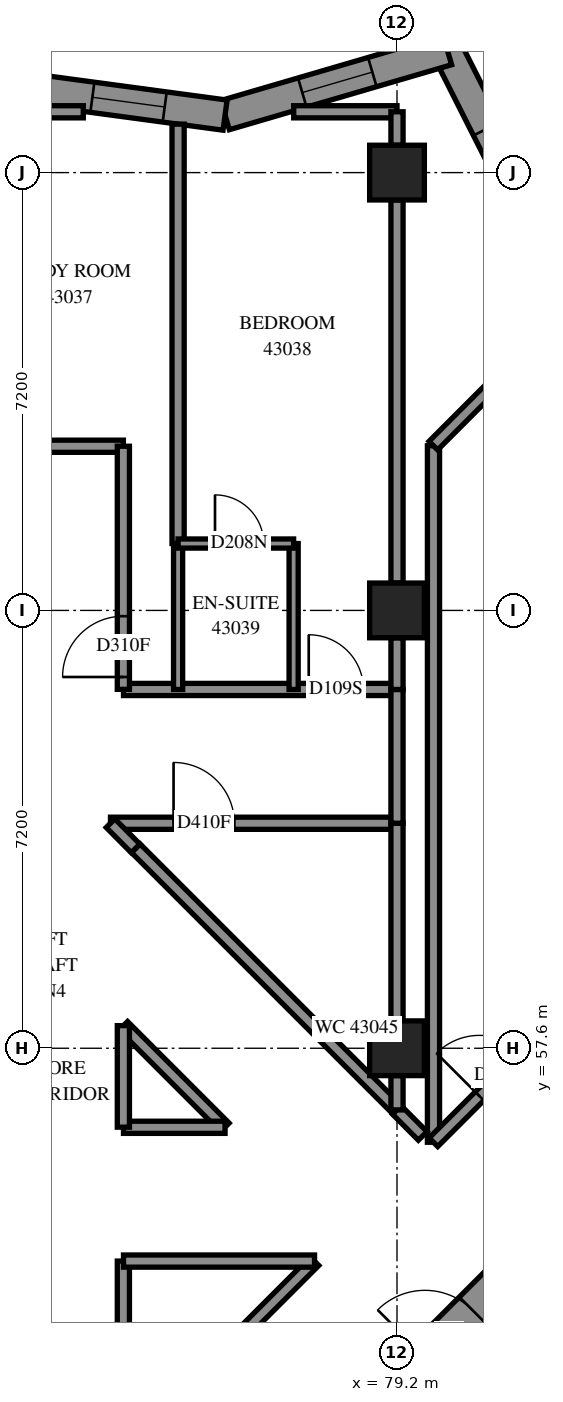
"""IFC4 building model, lengths in metres.
Left out: names, types, materials, properties, quantities, classifications, styles, units other than length and angle.
Written with IfcOpenShell. Run it as: python <this file> out.ifc"""

import sys

from ifc_helpers import new_model, si_unit, direction, frame, frame_2d, origin, origin_2d, place, context, subcontext, project, spatial, polyline, rectangle, outline, extrude, element, fill, save


model = new_model("IFC4")
c1 = context("Model", 3, precision=1e-05, world=origin(), true_north=direction((0.0, 1.0)))
c2 = subcontext(c1, "Body", "Model", "MODEL_VIEW")
j1 = project(units=[si_unit("LENGTHUNIT", "METRE"), si_unit("PLANEANGLEUNIT", "RADIAN")], contexts=[c1])
p1 = place(None, origin())
s1 = spatial("IfcSite", under=j1, at=p1, CompositionType="ELEMENT")
p2 = place(p1, origin())
s2 = spatial("IfcBuilding", under=s1, at=p2, CompositionType="ELEMENT")
p3 = place(p2, frame((0.0, 0.0, 159.2)))
s3 = spatial("IfcBuildingStorey", under=s2, at=p3, CompositionType="ELEMENT", Elevation=159.2)
for number, where, z_axis, x_axis in (
    (1, (79.2, 57.6, 0.0), (0.0, 0.0, 1.0), (1.0, 0.0, 0.0)),
    (2, (79.2, 64.8, 0.0), (0.0, 0.0, 1.0), (1.0, 0.0, 0.0)),
    (3, (79.2, 72.0, 0.0), (0.0, 0.0, 1.0), (1.0, 0.0, 0.0)),
):
    element("IfcColumn", number, at=place(p3, frame(where, z_axis=z_axis, x_axis=x_axis)), inside=s3, PredefinedType="COLUMN", context=c2, shape_type="SweptSolid", body=[
        extrude(rectangle(XDim=0.9, YDim=0.9, at=origin_2d()), origin(), (0.0, 0.0, 1.0), 3.1),
    ])
p4 = place(p3, frame((76.442, 49.302, -0.3), z_axis=(0.0, 0.0, 1.0), x_axis=(0.7071067812, 0.7071067812, 0.0)))
e4 = element("IfcWall", 4, at=p4, inside=s3, PredefinedType="SHEAR", context=c2, shape_type="SweptSolid", body=[
    extrude(rectangle(XDim=14.4, YDim=0.6, at=frame_2d((7.2, 0.0))), origin(), (0.0, 0.0, 1.0), 2.7),
])
p5 = place(p4, frame((4.55, 0.0, 0.3)))
e5 = element("IfcOpeningElement", 5, at=p5, cuts=e4, PredefinedType="OPENING", context=c2, shape_type="SweptSolid", body=[
    extrude(rectangle(XDim=1.1, YDim=2.1, at=frame_2d((0.55, 1.05))), frame((0.0, 0.31, 0.0), z_axis=(0.0, -1.0, 0.0), x_axis=(1.0, 0.0, 0.0)), (0.0, 0.0, 1.0), 0.62),
])
p6 = place(p4, frame((11.35, 0.0, 0.3)))
e6 = element("IfcOpeningElement", 6, at=p6, cuts=e4, PredefinedType="OPENING", context=c2, shape_type="SweptSolid", body=[
    extrude(rectangle(XDim=1.1, YDim=2.1, at=frame_2d((0.55, 1.05))), frame((0.0, 0.31, 0.0), z_axis=(0.0, -1.0, 0.0), x_axis=(1.0, 0.0, 0.0)), (0.0, 0.0, 1.0), 0.62),
])
p7 = place(p3, frame((81.565, 70.97, 0.0), z_axis=(0.0, 0.0, 1.0), x_axis=(-0.4506826549, 0.8926842357, 0.0)))
e7 = element("IfcWall", 7, at=p7, inside=s3, PredefinedType="SOLIDWALL", context=c2, shape_type="SweptSolid", body=[
    extrude(outline(polyline([(0.06, -0.25), (3.618, -0.25), (3.202, 0.25), (-0.06, 0.25), (0.06, -0.25)])), origin(), (0.0, 0.0, 1.0), 3.1),
])
p8 = place(p7, frame((0.764, 0.0, 0.45)))
e8 = element("IfcOpeningElement", 8, at=p8, cuts=e7, PredefinedType="OPENING", context=c2, shape_type="SweptSolid", body=[
    extrude(rectangle(XDim=1.2, YDim=2.5, at=frame_2d((0.6, 1.25))), frame((0.0, 0.26, 0.0), z_axis=(0.0, -1.0, 0.0), x_axis=(1.0, 0.0, 0.0)), (0.0, 0.0, 1.0), 0.52),
])
p9 = place(p3, frame((80.028, 74.014, 0.0), z_axis=(0.0, 0.0, 1.0), x_axis=(-0.9598407547, -0.2805454075, 0.0)))
e9 = element("IfcWall", 9, at=p9, inside=s3, PredefinedType="SOLIDWALL", context=c2, shape_type="SweptSolid", body=[
    extrude(outline(polyline([(-0.208, -0.25), (3.756, -0.25), (3.862, 0.25), (0.208, 0.25), (-0.208, -0.25)])), origin(), (0.0, 0.0, 1.0), 3.1),
])
p10 = place(p9, frame((1.286, 0.0, 0.45)))
e10 = element("IfcOpeningElement", 10, at=p10, cuts=e9, PredefinedType="OPENING", context=c2, shape_type="SweptSolid", body=[
    extrude(rectangle(XDim=1.2, YDim=2.5, at=frame_2d((0.6, 1.25))), frame((0.0, 0.26, 0.0), z_axis=(0.0, -1.0, 0.0), x_axis=(1.0, 0.0, 0.0)), (0.0, 0.0, 1.0), 0.52),
])
p11 = place(p3, frame((76.373, 72.945, 0.0), z_axis=(0.0, 0.0, 1.0), x_axis=(-0.9910680415, 0.1333571784, 0.0)))
e11 = element("IfcWall", 11, at=p11, inside=s3, PredefinedType="SOLIDWALL", context=c2, shape_type="SweptSolid", body=[
    extrude(outline(polyline([(0.053, -0.25), (3.892, -0.25), (3.824, 0.25), (-0.053, 0.25), (0.053, -0.25)])), origin(), (0.0, 0.0, 1.0), 3.1),
])
p12 = place(p11, frame((1.002, 0.0, 0.45)))
e12 = element("IfcOpeningElement", 12, at=p12, cuts=e11, PredefinedType="OPENING", context=c2, shape_type="SweptSolid", body=[
    extrude(rectangle(XDim=1.2, YDim=2.5, at=frame_2d((0.6, 1.25))), frame((0.0, 0.26, 0.0), z_axis=(0.0, -1.0, 0.0), x_axis=(1.0, 0.0, 0.0)), (0.0, 0.0, 1.0), 0.52),
])
p13 = place(p3, frame((54.9, 67.5, 0.0), z_axis=(0.0, 0.0, 1.0), x_axis=(1.0, 0.0, 0.0)))
e13 = element("IfcWall", 13, at=p13, inside=s3, PredefinedType="PARTITIONING", context=c2, shape_type="SweptSolid", body=[
    extrude(rectangle(XDim=19.8, YDim=0.2, at=frame_2d((9.9, 0.0))), origin(), (0.0, 0.0, 1.0), 3.1),
])
p14 = place(p13, frame((6.599, 0.0, 0.0)))
e14 = element("IfcOpeningElement", 14, at=p14, cuts=e13, PredefinedType="OPENING", context=c2, shape_type="SweptSolid", body=[
    extrude(rectangle(XDim=0.9, YDim=2.1, at=frame_2d((0.45, 1.05))), frame((0.0, 0.11, 0.0), z_axis=(0.0, -1.0, 0.0), x_axis=(1.0, 0.0, 0.0)), (0.0, 0.0, 1.0), 0.22),
])
p15 = place(p13, frame((13.799, 0.0, 0.0)))
e15 = element("IfcOpeningElement", 15, at=p15, cuts=e13, PredefinedType="OPENING", context=c2, shape_type="SweptSolid", body=[
    extrude(rectangle(XDim=0.9, YDim=2.1, at=frame_2d((0.45, 1.05))), frame((0.0, 0.11, 0.0), z_axis=(0.0, -1.0, 0.0), x_axis=(1.0, 0.0, 0.0)), (0.0, 0.0, 1.0), 0.22),
])
p16 = place(p3, frame((79.8, 56.054, 0.0), z_axis=(0.0, 0.0, 1.0), x_axis=(0.0, 1.0, 0.0)))
e16 = element("IfcWall", 16, at=p16, inside=s3, PredefinedType="PARTITIONING", context=c2, shape_type="SweptSolid", body=[
    extrude(rectangle(XDim=11.454, YDim=0.2, at=frame_2d((5.727, 0.0))), origin(), (0.0, 0.0, 1.0), 3.1),
])
p17 = place(p3, frame((79.799, 56.055, 0.0), z_axis=(0.0, 0.0, 1.0), x_axis=(0.7071067812, 0.7071067812, 0.0)))
e17 = element("IfcWall", 17, at=p17, inside=s3, PredefinedType="PARTITIONING", context=c2, shape_type="SweptSolid", body=[
    extrude(rectangle(XDim=9.95, YDim=0.2, at=frame_2d((4.975, 0.0))), origin(), (0.0, 0.0, 1.0), 3.1),
])
p18 = place(p17, frame((1.071, 0.0, 0.0)))
e18 = element("IfcOpeningElement", 18, at=p18, cuts=e17, PredefinedType="OPENING", context=c2, shape_type="SweptSolid", body=[
    extrude(rectangle(XDim=1.0, YDim=2.1, at=frame_2d((0.5, 1.05))), frame((0.0, 0.11, 0.0), z_axis=(0.0, -1.0, 0.0), x_axis=(1.0, 0.0, 0.0)), (0.0, 0.0, 1.0), 0.22),
])
p19 = place(p3, frame((75.6, 65.9, 0.0), z_axis=(0.0, 0.0, 1.0), x_axis=(0.0, 1.0, 0.0)))
e19 = element("IfcWall", 19, at=p19, inside=s3, PredefinedType="PARTITIONING", context=c2, shape_type="SweptSolid", body=[
    extrude(rectangle(XDim=6.897, YDim=0.2, at=frame_2d((3.448, 0.0))), origin(), (0.0, 0.0, 1.0), 3.1),
])
p20 = place(p3, frame((79.2, 65.25, 0.0), z_axis=(0.0, 0.0, 1.0), x_axis=(0.0, 1.0, 0.0)))
e20 = element("IfcWall", 20, at=p20, inside=s3, PredefinedType="PARTITIONING", context=c2, shape_type="SweptSolid", body=[
    extrude(rectangle(XDim=6.3, YDim=0.2, at=frame_2d((3.15, 0.0))), origin(), (0.0, 0.0, 1.0), 3.1),
])
p21 = place(p3, frame((74.903, 60.889, 0.0), z_axis=(0.0, 0.0, 1.0), x_axis=(0.7071067812, -0.7071067812, 0.0)))
e21 = element("IfcWall", 21, at=p21, inside=s3, PredefinedType="PARTITIONING", context=c2, shape_type="SweptSolid", body=[
    extrude(rectangle(XDim=6.081, YDim=0.2, at=frame_2d((3.041, 0.0))), origin(), (0.0, 0.0, 1.0), 3.1),
])
p22 = place(p3, frame((74.488, 61.3, 0.0), z_axis=(0.0, 0.0, 1.0), x_axis=(1.0, 0.0, 0.0)))
e22 = element("IfcWall", 22, at=p22, inside=s3, PredefinedType="PARTITIONING", context=c2, shape_type="SweptSolid", body=[
    extrude(rectangle(XDim=4.712, YDim=0.2, at=frame_2d((2.356, 0.0))), origin(), (0.0, 0.0, 1.0), 3.1),
])
p23 = place(p22, frame((1.037, 0.0, 0.0)))
e23 = element("IfcOpeningElement", 23, at=p23, cuts=e22, PredefinedType="OPENING", context=c2, shape_type="SweptSolid", body=[
    extrude(rectangle(XDim=1.0, YDim=2.1, at=frame_2d((0.5, 1.05))), frame((0.0, 0.11, 0.0), z_axis=(0.0, -1.0, 0.0), x_axis=(1.0, 0.0, 0.0)), (0.0, 0.0, 1.0), 0.22),
])
p24 = place(p3, frame((74.702, 63.5, 0.0), z_axis=(0.0, 0.0, 1.0), x_axis=(1.0, 0.0, 0.0)))
e24 = element("IfcWall", 24, at=p24, inside=s3, PredefinedType="PARTITIONING", context=c2, shape_type="SweptSolid", body=[
    extrude(rectangle(XDim=4.498, YDim=0.2, at=frame_2d((2.249, 0.0))), origin(), (0.0, 0.0, 1.0), 3.1),
])
p25 = place(p24, frame((3.046, 0.0, 0.0)))
e25 = element("IfcOpeningElement", 25, at=p25, cuts=e24, PredefinedType="OPENING", context=c2, shape_type="SweptSolid", body=[
    extrude(rectangle(XDim=0.9, YDim=2.1, at=frame_2d((0.45, 1.05))), frame((0.0, 0.11, 0.0), z_axis=(0.0, -1.0, 0.0), x_axis=(1.0, 0.0, 0.0)), (0.0, 0.0, 1.0), 0.22),
])
p26 = place(p3, frame((74.701, 50.957, 0.0), z_axis=(0.0, 0.0, 1.0), x_axis=(0.7071067812, 0.7071067812, 0.0)))
e26 = element("IfcWall", 26, at=p26, inside=s3, PredefinedType="PARTITIONING", context=c2, shape_type="SweptSolid", body=[
    extrude(rectangle(XDim=4.444, YDim=0.2, at=frame_2d((2.222, 0.0))), origin(), (0.0, 0.0, 1.0), 3.1),
])
p27 = place(p3, frame((74.7, 63.502, 0.0), z_axis=(0.0, 0.0, 1.0), x_axis=(0.0, 1.0, 0.0)))
e27 = element("IfcWall", 27, at=p27, inside=s3, PredefinedType="PARTITIONING", context=c2, shape_type="SweptSolid", body=[
    extrude(rectangle(XDim=3.998, YDim=0.2, at=frame_2d((1.999, 0.0))), origin(), (0.0, 0.0, 1.0), 3.1),
])
p28 = place(p27, frame((0.203, 0.0, 0.0)))
e28 = element("IfcOpeningElement", 28, at=p28, cuts=e27, PredefinedType="OPENING", context=c2, shape_type="SweptSolid", body=[
    extrude(rectangle(XDim=1.0, YDim=2.1, at=frame_2d((0.5, 1.05))), frame((0.0, 0.11, 0.0), z_axis=(0.0, -1.0, 0.0), x_axis=(1.0, 0.0, 0.0)), (0.0, 0.0, 1.0), 0.22),
])
p29 = place(p3, frame((79.798, 67.51, 0.0), z_axis=(0.0, 0.0, 1.0), x_axis=(0.7068308048, 0.7073826499, 0.0)))
e29 = element("IfcWall", 29, at=p29, inside=s3, PredefinedType="PARTITIONING", context=c2, shape_type="SweptSolid", body=[
    extrude(rectangle(XDim=3.624, YDim=0.2, at=frame_2d((1.812, 0.0))), origin(), (0.0, 0.0, 1.0), 3.1),
])
p30 = place(p3, frame((79.2, 58.05, 0.0), z_axis=(0.0, 0.0, 1.0), x_axis=(0.0, 1.0, 0.0)))
e30 = element("IfcWall", 30, at=p30, inside=s3, PredefinedType="PARTITIONING", context=c2, shape_type="SweptSolid", body=[
    extrude(rectangle(XDim=3.25, YDim=0.2, at=frame_2d((1.625, 0.0))), origin(), (0.0, 0.0, 1.0), 3.1),
])
p31 = place(p3, frame((74.7, 50.956, 0.0), z_axis=(0.0, 0.0, 1.0), x_axis=(0.0, 1.0, 0.0)))
e31 = element("IfcWall", 31, at=p31, inside=s3, PredefinedType="PARTITIONING", context=c2, shape_type="SweptSolid", body=[
    extrude(rectangle(XDim=3.144, YDim=0.2, at=frame_2d((1.572, 0.0))), origin(), (0.0, 0.0, 1.0), 3.1),
])
p32 = place(p3, frame((74.702, 54.1, 0.0), z_axis=(0.0, 0.0, 1.0), x_axis=(1.0, 0.0, 0.0)))
e32 = element("IfcWall", 32, at=p32, inside=s3, PredefinedType="PARTITIONING", context=c2, shape_type="SweptSolid", body=[
    extrude(rectangle(XDim=3.142, YDim=0.2, at=frame_2d((1.571, 0.0))), origin(), (0.0, 0.0, 1.0), 3.1),
])
p33 = place(p3, frame((71.057, 73.0, 0.0), z_axis=(0.0, 0.0, 1.0), x_axis=(1.0, 0.0, 0.0)))
e33 = element("IfcWall", 33, at=p33, inside=s3, PredefinedType="PARTITIONING", context=c2, shape_type="SweptSolid", body=[
    extrude(rectangle(XDim=2.983, YDim=0.2, at=frame_2d((1.492, 0.0))), origin(), (0.0, 0.0, 1.0), 3.1),
])
for number, where, z_axis, x_axis in (
    (34, (75.6, 63.5, 0.0), (0.0, 0.0, 1.0), (0.0, 1.0, 0.0)),
    (35, (77.5, 63.5, 0.0), (0.0, 0.0, 1.0), (0.0, 1.0, 0.0)),
):
    element("IfcWall", number, at=place(p3, frame(where, z_axis=z_axis, x_axis=x_axis)), inside=s3, PredefinedType="PARTITIONING", context=c2, shape_type="SweptSolid", body=[
        extrude(rectangle(XDim=2.4, YDim=0.15, at=frame_2d((1.2, 0.0))), origin(), (0.0, 0.0, 1.0), 3.1),
    ])
p34 = place(p3, frame((74.699, 57.969, 0.0), z_axis=(0.0, 0.0, 1.0), x_axis=(0.7071067812, -0.7071067812, 0.0)))
e36 = element("IfcWall", 36, at=p34, inside=s3, PredefinedType="PARTITIONING", context=c2, shape_type="SweptSolid", body=[
    extrude(rectangle(XDim=2.362, YDim=0.2, at=frame_2d((1.181, 0.0))), origin(), (0.0, 0.0, 1.0), 3.1),
])
p35 = place(p3, frame((79.2, 61.3, 0.0), z_axis=(0.0, 0.0, 1.0), x_axis=(0.0, 1.0, 0.0)))
e37 = element("IfcWall", 37, at=p35, inside=s3, PredefinedType="PARTITIONING", context=c2, shape_type="SweptSolid", body=[
    extrude(rectangle(XDim=2.2, YDim=0.2, at=frame_2d((1.1, 0.0))), origin(), (0.0, 0.0, 1.0), 3.1),
])
p36 = place(p3, frame((75.6, 65.9, 0.0), z_axis=(0.0, 0.0, 1.0), x_axis=(1.0, 0.0, 0.0)))
e38 = element("IfcWall", 38, at=p36, inside=s3, PredefinedType="PARTITIONING", context=c2, shape_type="SweptSolid", body=[
    extrude(rectangle(XDim=1.9, YDim=0.15, at=frame_2d((0.95, 0.0))), origin(), (0.0, 0.0, 1.0), 3.1),
])
p37 = place(p36, frame((0.607, 0.0, 0.0)))
e39 = element("IfcOpeningElement", 39, at=p37, cuts=e38, PredefinedType="OPENING", context=c2, shape_type="SweptSolid", body=[
    extrude(rectangle(XDim=0.8, YDim=2.1, at=frame_2d((0.4, 1.05))), frame((0.0, 0.085, 0.0), z_axis=(0.0, -1.0, 0.0), x_axis=(1.0, 0.0, 0.0)), (0.0, 0.0, 1.0), 0.17),
])
p38 = place(p3, frame((77.501, 73.0, 0.0), z_axis=(0.0, 0.0, 1.0), x_axis=(1.0, 0.0, 0.0)))
e40 = element("IfcWall", 40, at=p38, inside=s3, PredefinedType="PARTITIONING", context=c2, shape_type="SweptSolid", body=[
    extrude(rectangle(XDim=1.699, YDim=0.2, at=frame_2d((0.849, 0.0))), origin(), (0.0, 0.0, 1.0), 3.1),
])
for number, where, z_axis, x_axis in (
    (41, (74.702, 56.3, 0.0), (0.0, 0.0, 1.0), (1.0, 0.0, 0.0)),
    (42, (74.7, 56.302, 0.0), (0.0, 0.0, 1.0), (0.0, 1.0, 0.0)),
):
    element("IfcWall", number, at=place(p3, frame(where, z_axis=z_axis, x_axis=x_axis)), inside=s3, PredefinedType="PARTITIONING", context=c2, shape_type="SweptSolid", body=[
        extrude(rectangle(XDim=1.67, YDim=0.2, at=frame_2d((0.835, 0.0))), origin(), (0.0, 0.0, 1.0), 3.1),
    ])
p39 = place(p3, frame((79.2, 63.5, 0.0), z_axis=(0.0, 0.0, 1.0), x_axis=(0.0, 1.0, 0.0)))
e43 = element("IfcWall", 43, at=p39, inside=s3, PredefinedType="PARTITIONING", context=c2, shape_type="SweptSolid", body=[
    extrude(rectangle(XDim=0.85, YDim=0.2, at=frame_2d((0.425, 0.0))), origin(), (0.0, 0.0, 1.0), 3.1),
])
p40 = place(p3, frame((79.198, 56.584, 0.0), z_axis=(0.0, 0.0, 1.0), x_axis=(0.7054410477, -0.7087685999, 0.0)))
e44 = element("IfcWall", 44, at=p40, inside=s3, PredefinedType="PARTITIONING", context=c2, shape_type="SweptSolid", body=[
    extrude(rectangle(XDim=0.601, YDim=0.2, at=frame_2d((0.3, 0.0))), origin(), (0.0, 0.0, 1.0), 3.1),
])
p41 = place(p3, frame((74.489, 61.301, 0.0), z_axis=(0.0, 0.0, 1.0), x_axis=(0.7053925905, -0.7088168263, 0.0)))
e45 = element("IfcWall", 45, at=p41, inside=s3, PredefinedType="PARTITIONING", context=c2, shape_type="SweptSolid", body=[
    extrude(rectangle(XDim=0.584, YDim=0.2, at=frame_2d((0.292, 0.0))), origin(), (0.0, 0.0, 1.0), 3.1),
])
p42 = place(p3, frame((79.2, 56.586, 0.0), z_axis=(0.0, 0.0, 1.0), x_axis=(0.0, 1.0, 0.0)))
e46 = element("IfcWall", 46, at=p42, inside=s3, PredefinedType="PARTITIONING", context=c2, shape_type="SweptSolid", body=[
    extrude(rectangle(XDim=0.564, YDim=0.2, at=frame_2d((0.282, 0.0))), origin(), (0.0, 0.0, 1.0), 3.1),
])
p43 = place(p3, frame((79.2, 72.45, 0.0), z_axis=(0.0, 0.0, 1.0), x_axis=(0.0, 1.0, 0.0)))
e47 = element("IfcWall", 47, at=p43, inside=s3, PredefinedType="PARTITIONING", context=c2, shape_type="SweptSolid", body=[
    extrude(rectangle(XDim=0.55, YDim=0.2, at=frame_2d((0.275, 0.0))), origin(), (0.0, 0.0, 1.0), 3.1),
])
p44 = place(p8, origin())
e48 = element("IfcWindow", 48, at=p44, inside=s3, PartitioningType="SINGLE_PANEL", PredefinedType="WINDOW", context=c2, shape_type="SweptSolid", body=[
    extrude(rectangle(XDim=1.2, YDim=2.5, at=frame_2d((0.6, 1.25))), frame((0.0, 0.18, 0.0), z_axis=(0.0, -1.0, 0.0), x_axis=(1.0, 0.0, 0.0)), (0.0, 0.0, 1.0), 0.06),
])
fill(e8, e48)
p45 = place(p10, origin())
e49 = element("IfcWindow", 49, at=p45, inside=s3, PartitioningType="SINGLE_PANEL", PredefinedType="WINDOW", context=c2, shape_type="SweptSolid", body=[
    extrude(rectangle(XDim=1.2, YDim=2.5, at=frame_2d((0.6, 1.25))), frame((0.0, 0.18, 0.0), z_axis=(0.0, -1.0, 0.0), x_axis=(1.0, 0.0, 0.0)), (0.0, 0.0, 1.0), 0.06),
])
fill(e10, e49)
p46 = place(p12, origin())
e50 = element("IfcWindow", 50, at=p46, inside=s3, PartitioningType="SINGLE_PANEL", PredefinedType="WINDOW", context=c2, shape_type="SweptSolid", body=[
    extrude(rectangle(XDim=1.2, YDim=2.5, at=frame_2d((0.6, 1.25))), frame((0.0, 0.18, 0.0), z_axis=(0.0, -1.0, 0.0), x_axis=(1.0, 0.0, 0.0)), (0.0, 0.0, 1.0), 0.06),
])
fill(e12, e50)
p47 = place(p5, origin())
e51 = element("IfcDoor", 51, at=p47, inside=s3, OperationType="DOUBLE_DOOR_SINGLE_SWING", PredefinedType="DOOR", context=c2, shape_type="SweptSolid", body=[
    extrude(rectangle(XDim=1.1, YDim=2.1, at=frame_2d((0.55, 1.05))), frame((0.0, 0.025, 0.0), z_axis=(0.0, -1.0, 0.0), x_axis=(1.0, 0.0, 0.0)), (0.0, 0.0, 1.0), 0.05),
])
fill(e5, e51)
p48 = place(p28, origin())
e52 = element("IfcDoor", 52, at=p48, inside=s3, OperationType="SINGLE_SWING_RIGHT", PredefinedType="DOOR", context=c2, shape_type="SweptSolid", body=[
    extrude(rectangle(XDim=1.0, YDim=2.1, at=frame_2d((0.5, 1.05))), frame((0.0, 0.025, 0.0), z_axis=(0.0, -1.0, 0.0), x_axis=(1.0, 0.0, 0.0)), (0.0, 0.0, 1.0), 0.05),
])
fill(e28, e52)
p49 = place(p25, origin())
e53 = element("IfcDoor", 53, at=p49, inside=s3, OperationType="SINGLE_SWING_LEFT", PredefinedType="DOOR", context=c2, shape_type="SweptSolid", body=[
    extrude(rectangle(XDim=0.9, YDim=2.1, at=frame_2d((0.45, 1.05))), frame((0.0, 0.025, 0.0), z_axis=(0.0, -1.0, 0.0), x_axis=(1.0, 0.0, 0.0)), (0.0, 0.0, 1.0), 0.05),
])
fill(e25, e53)
p50 = place(p37, origin())
e54 = element("IfcDoor", 54, at=p50, inside=s3, OperationType="SINGLE_SWING_RIGHT", PredefinedType="DOOR", context=c2, shape_type="SweptSolid", body=[
    extrude(rectangle(XDim=0.8, YDim=2.1, at=frame_2d((0.4, 1.05))), frame((0.0, 0.025, 0.0), z_axis=(0.0, -1.0, 0.0), x_axis=(1.0, 0.0, 0.0)), (0.0, 0.0, 1.0), 0.05),
])
fill(e39, e54)
p51 = place(p23, origin())
e55 = element("IfcDoor", 55, at=p51, inside=s3, OperationType="SINGLE_SWING_RIGHT", PredefinedType="DOOR", context=c2, shape_type="SweptSolid", body=[
    extrude(rectangle(XDim=1.0, YDim=2.1, at=frame_2d((0.5, 1.05))), frame((0.0, 0.025, 0.0), z_axis=(0.0, -1.0, 0.0), x_axis=(1.0, 0.0, 0.0)), (0.0, 0.0, 1.0), 0.05),
])
fill(e23, e55)
p52 = place(p18, origin())
e56 = element("IfcDoor", 56, at=p52, inside=s3, OperationType="SINGLE_SWING_RIGHT", PredefinedType="DOOR", context=c2, shape_type="SweptSolid", body=[
    extrude(rectangle(XDim=1.0, YDim=2.1, at=frame_2d((0.5, 1.05))), frame((0.0, 0.025, 0.0), z_axis=(0.0, -1.0, 0.0), x_axis=(1.0, 0.0, 0.0)), (0.0, 0.0, 1.0), 0.05),
])
fill(e18, e56)
save(model, sys.argv[1])
